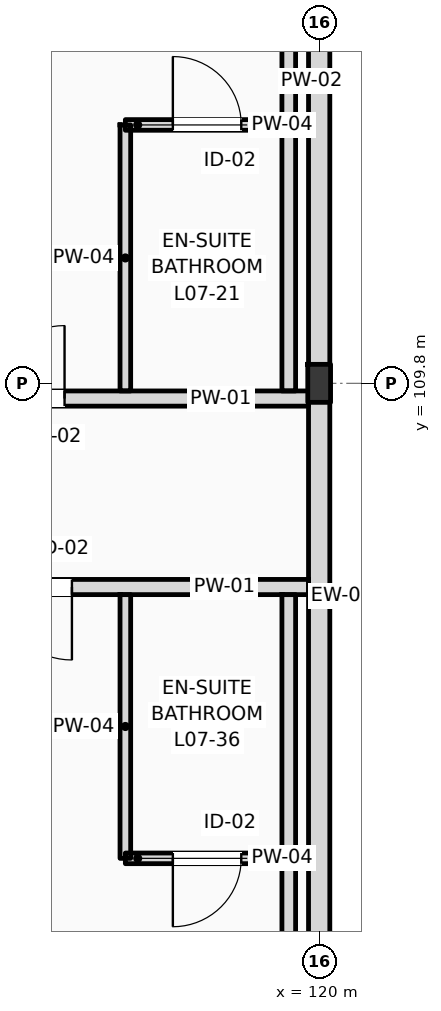
"""IFC4 building model, lengths in metres.
Left out: names, types, materials, properties, quantities, classifications, styles, units other than length and angle.
Written with IfcOpenShell. Run it as: python <this file> out.ifc"""

import sys

from ifc_helpers import new_model, si_unit, direction, frame, frame_2d, origin, origin_2d, place, context, subcontext, project, spatial, rectangle, i_section, extrude, element, fill, save


model = new_model("IFC4")
c1 = context("Model", 3, precision=1e-05, world=origin(), true_north=direction((0.0, 1.0)))
c2 = subcontext(c1, "Body", "Model", "MODEL_VIEW")
j1 = project(units=[si_unit("LENGTHUNIT", "METRE"), si_unit("PLANEANGLEUNIT", "RADIAN")], contexts=[c1])
p1 = place(None, origin())
s1 = spatial("IfcSite", under=j1, at=p1, CompositionType="ELEMENT")
p2 = place(p1, origin())
s2 = spatial("IfcBuilding", under=s1, at=p2, CompositionType="ELEMENT")
p3 = place(p2, frame((0.0, 0.0, 31.8)))
s3 = spatial("IfcBuildingStorey", under=s2, at=p3, CompositionType="ELEMENT", Elevation=31.8)
p4 = place(p3, frame((120.0, 109.8, 0.0), z_axis=(0.0, 0.0, 1.0), x_axis=(1.0, 0.0, 0.0)))
e1 = element("IfcColumn", 1, at=p4, inside=s3, PredefinedType="COLUMN", context=c2, shape_type="SweptSolid", body=[
    extrude(i_section(OverallWidth=0.3, OverallDepth=0.5, WebThickness=0.014, FlangeThickness=0.028, FilletRadius=0.027, at=origin_2d()), origin(), (0.0, 0.0, 1.0), 3.6),
])
p5 = place(p3, frame((120.0, 96.0, 0.0), z_axis=(0.0, 0.0, 1.0), x_axis=(0.0, 1.0, 0.0)))
e2 = element("IfcWall", 2, at=p5, inside=s3, PredefinedType="STANDARD", context=c2, shape_type="SweptSolid", body=[
    extrude(rectangle(XDim=22.0, YDim=0.28, at=frame_2d((11.0, 0.0))), origin(), (0.0, 0.0, 1.0), 2.91),
])
p6 = place(p3, frame((10.65, 109.6, 0.0), z_axis=(0.0, 0.0, 1.0), x_axis=(1.0, 0.0, 0.0)))
e3 = element("IfcWall", 3, at=p6, inside=s3, PredefinedType="PARTITIONING", context=c2, shape_type="SweptSolid", body=[
    extrude(rectangle(XDim=109.21, YDim=0.2, at=frame_2d((54.605, 0.0))), origin(), (0.0, 0.0, 1.0), 2.72),
])
p7 = place(p6, frame((15.825, 0.0, 0.0)))
e4 = element("IfcOpeningElement", 4, at=p7, cuts=e3, PredefinedType="OPENING", context=c2, shape_type="SweptSolid", body=[
    extrude(rectangle(XDim=1.02, YDim=2.2, at=frame_2d((0.51, 1.1))), frame((0.0, 0.11, 0.0), z_axis=(0.0, -1.0, 0.0), x_axis=(1.0, 0.0, 0.0)), (0.0, 0.0, 1.0), 0.22),
])
p8 = place(p6, frame((19.87, 0.0, 0.0)))
e5 = element("IfcOpeningElement", 5, at=p8, cuts=e3, PredefinedType="OPENING", context=c2, shape_type="SweptSolid", body=[
    extrude(rectangle(XDim=1.02, YDim=2.2, at=frame_2d((0.51, 1.1))), frame((0.0, 0.11, 0.0), z_axis=(0.0, -1.0, 0.0), x_axis=(1.0, 0.0, 0.0)), (0.0, 0.0, 1.0), 0.22),
])
p9 = place(p6, frame((24.47, 0.0, 0.0)))
e6 = element("IfcOpeningElement", 6, at=p9, cuts=e3, PredefinedType="OPENING", context=c2, shape_type="SweptSolid", body=[
    extrude(rectangle(XDim=1.02, YDim=2.2, at=frame_2d((0.51, 1.1))), frame((0.0, 0.11, 0.0), z_axis=(0.0, -1.0, 0.0), x_axis=(1.0, 0.0, 0.0)), (0.0, 0.0, 1.0), 0.22),
])
p10 = place(p6, frame((26.92, 0.0, 0.0)))
e7 = element("IfcOpeningElement", 7, at=p10, cuts=e3, PredefinedType="OPENING", context=c2, shape_type="SweptSolid", body=[
    extrude(rectangle(XDim=1.02, YDim=2.2, at=frame_2d((0.51, 1.1))), frame((0.0, 0.11, 0.0), z_axis=(0.0, -1.0, 0.0), x_axis=(1.0, 0.0, 0.0)), (0.0, 0.0, 1.0), 0.22),
])
p11 = place(p6, frame((33.7, 0.0, 0.0)))
e8 = element("IfcOpeningElement", 8, at=p11, cuts=e3, PredefinedType="OPENING", context=c2, shape_type="SweptSolid", body=[
    extrude(rectangle(XDim=0.96, YDim=2.2, at=frame_2d((0.48, 1.1))), frame((0.0, 0.11, 0.0), z_axis=(0.0, -1.0, 0.0), x_axis=(1.0, 0.0, 0.0)), (0.0, 0.0, 1.0), 0.22),
])
p12 = place(p6, frame((35.9, 0.0, 0.0)))
e9 = element("IfcOpeningElement", 9, at=p12, cuts=e3, PredefinedType="OPENING", context=c2, shape_type="SweptSolid", body=[
    extrude(rectangle(XDim=0.96, YDim=2.2, at=frame_2d((0.48, 1.1))), frame((0.0, 0.11, 0.0), z_axis=(0.0, -1.0, 0.0), x_axis=(1.0, 0.0, 0.0)), (0.0, 0.0, 1.0), 0.22),
])
p13 = place(p6, frame((42.9, 0.0, 0.0)))
e10 = element("IfcOpeningElement", 10, at=p13, cuts=e3, PredefinedType="OPENING", context=c2, shape_type="SweptSolid", body=[
    extrude(rectangle(XDim=0.96, YDim=2.2, at=frame_2d((0.48, 1.1))), frame((0.0, 0.11, 0.0), z_axis=(0.0, -1.0, 0.0), x_axis=(1.0, 0.0, 0.0)), (0.0, 0.0, 1.0), 0.22),
])
p14 = place(p6, frame((47.5, 0.0, 0.0)))
e11 = element("IfcOpeningElement", 11, at=p14, cuts=e3, PredefinedType="OPENING", context=c2, shape_type="SweptSolid", body=[
    extrude(rectangle(XDim=0.96, YDim=2.2, at=frame_2d((0.48, 1.1))), frame((0.0, 0.11, 0.0), z_axis=(0.0, -1.0, 0.0), x_axis=(1.0, 0.0, 0.0)), (0.0, 0.0, 1.0), 0.22),
])
p15 = place(p6, frame((49.95, 0.0, 0.0)))
e12 = element("IfcOpeningElement", 12, at=p15, cuts=e3, PredefinedType="OPENING", context=c2, shape_type="SweptSolid", body=[
    extrude(rectangle(XDim=0.96, YDim=2.2, at=frame_2d((0.48, 1.1))), frame((0.0, 0.11, 0.0), z_axis=(0.0, -1.0, 0.0), x_axis=(1.0, 0.0, 0.0)), (0.0, 0.0, 1.0), 0.22),
])
p16 = place(p6, frame((56.7, 0.0, 0.0)))
e13 = element("IfcOpeningElement", 13, at=p16, cuts=e3, PredefinedType="OPENING", context=c2, shape_type="SweptSolid", body=[
    extrude(rectangle(XDim=0.96, YDim=2.2, at=frame_2d((0.48, 1.1))), frame((0.0, 0.11, 0.0), z_axis=(0.0, -1.0, 0.0), x_axis=(1.0, 0.0, 0.0)), (0.0, 0.0, 1.0), 0.22),
])
p17 = place(p6, frame((59.15, 0.0, 0.0)))
e14 = element("IfcOpeningElement", 14, at=p17, cuts=e3, PredefinedType="OPENING", context=c2, shape_type="SweptSolid", body=[
    extrude(rectangle(XDim=0.96, YDim=2.2, at=frame_2d((0.48, 1.1))), frame((0.0, 0.11, 0.0), z_axis=(0.0, -1.0, 0.0), x_axis=(1.0, 0.0, 0.0)), (0.0, 0.0, 1.0), 0.22),
])
p18 = place(p6, frame((65.9, 0.0, 0.0)))
e15 = element("IfcOpeningElement", 15, at=p18, cuts=e3, PredefinedType="OPENING", context=c2, shape_type="SweptSolid", body=[
    extrude(rectangle(XDim=0.96, YDim=2.2, at=frame_2d((0.48, 1.1))), frame((0.0, 0.11, 0.0), z_axis=(0.0, -1.0, 0.0), x_axis=(1.0, 0.0, 0.0)), (0.0, 0.0, 1.0), 0.22),
])
p19 = place(p6, frame((70.5, 0.0, 0.0)))
e16 = element("IfcOpeningElement", 16, at=p19, cuts=e3, PredefinedType="OPENING", context=c2, shape_type="SweptSolid", body=[
    extrude(rectangle(XDim=0.96, YDim=2.2, at=frame_2d((0.48, 1.1))), frame((0.0, 0.11, 0.0), z_axis=(0.0, -1.0, 0.0), x_axis=(1.0, 0.0, 0.0)), (0.0, 0.0, 1.0), 0.22),
])
p20 = place(p6, frame((72.95, 0.0, 0.0)))
e17 = element("IfcOpeningElement", 17, at=p20, cuts=e3, PredefinedType="OPENING", context=c2, shape_type="SweptSolid", body=[
    extrude(rectangle(XDim=0.96, YDim=2.2, at=frame_2d((0.48, 1.1))), frame((0.0, 0.11, 0.0), z_axis=(0.0, -1.0, 0.0), x_axis=(1.0, 0.0, 0.0)), (0.0, 0.0, 1.0), 0.22),
])
p21 = place(p6, frame((79.7, 0.0, 0.0)))
e18 = element("IfcOpeningElement", 18, at=p21, cuts=e3, PredefinedType="OPENING", context=c2, shape_type="SweptSolid", body=[
    extrude(rectangle(XDim=0.96, YDim=2.2, at=frame_2d((0.48, 1.1))), frame((0.0, 0.11, 0.0), z_axis=(0.0, -1.0, 0.0), x_axis=(1.0, 0.0, 0.0)), (0.0, 0.0, 1.0), 0.22),
])
p22 = place(p6, frame((82.15, 0.0, 0.0)))
e19 = element("IfcOpeningElement", 19, at=p22, cuts=e3, PredefinedType="OPENING", context=c2, shape_type="SweptSolid", body=[
    extrude(rectangle(XDim=0.96, YDim=2.2, at=frame_2d((0.48, 1.1))), frame((0.0, 0.11, 0.0), z_axis=(0.0, -1.0, 0.0), x_axis=(1.0, 0.0, 0.0)), (0.0, 0.0, 1.0), 0.22),
])
p23 = place(p6, frame((88.9, 0.0, 0.0)))
e20 = element("IfcOpeningElement", 20, at=p23, cuts=e3, PredefinedType="OPENING", context=c2, shape_type="SweptSolid", body=[
    extrude(rectangle(XDim=0.96, YDim=2.2, at=frame_2d((0.48, 1.1))), frame((0.0, 0.11, 0.0), z_axis=(0.0, -1.0, 0.0), x_axis=(1.0, 0.0, 0.0)), (0.0, 0.0, 1.0), 0.22),
])
p24 = place(p6, frame((93.75, 0.0, 0.0)))
e21 = element("IfcOpeningElement", 21, at=p24, cuts=e3, PredefinedType="OPENING", context=c2, shape_type="SweptSolid", body=[
    extrude(rectangle(XDim=0.96, YDim=2.2, at=frame_2d((0.48, 1.1))), frame((0.0, 0.11, 0.0), z_axis=(0.0, -1.0, 0.0), x_axis=(1.0, 0.0, 0.0)), (0.0, 0.0, 1.0), 0.22),
])
p25 = place(p6, frame((98.1, 0.0, 0.0)))
e22 = element("IfcOpeningElement", 22, at=p25, cuts=e3, PredefinedType="OPENING", context=c2, shape_type="SweptSolid", body=[
    extrude(rectangle(XDim=0.96, YDim=2.2, at=frame_2d((0.48, 1.1))), frame((0.0, 0.11, 0.0), z_axis=(0.0, -1.0, 0.0), x_axis=(1.0, 0.0, 0.0)), (0.0, 0.0, 1.0), 0.22),
])
p26 = place(p6, frame((102.7, 0.0, 0.0)))
e23 = element("IfcOpeningElement", 23, at=p26, cuts=e3, PredefinedType="OPENING", context=c2, shape_type="SweptSolid", body=[
    extrude(rectangle(XDim=0.96, YDim=2.2, at=frame_2d((0.48, 1.1))), frame((0.0, 0.11, 0.0), z_axis=(0.0, -1.0, 0.0), x_axis=(1.0, 0.0, 0.0)), (0.0, 0.0, 1.0), 0.22),
])
p27 = place(p6, frame((105.04, 0.0, 0.0)))
e24 = element("IfcOpeningElement", 24, at=p27, cuts=e3, PredefinedType="OPENING", context=c2, shape_type="SweptSolid", body=[
    extrude(rectangle(XDim=0.96, YDim=2.2, at=frame_2d((0.48, 1.1))), frame((0.0, 0.11, 0.0), z_axis=(0.0, -1.0, 0.0), x_axis=(1.0, 0.0, 0.0)), (0.0, 0.0, 1.0), 0.22),
])
p28 = place(p6, frame((2.716, 0.0, 0.0)))
e25 = element("IfcOpeningElement", 25, at=p28, cuts=e3, PredefinedType="OPENING", context=c2, shape_type="SweptSolid", body=[
    extrude(rectangle(XDim=1.35, YDim=2.25, at=frame_2d((0.675, 1.125))), frame((0.0, 0.11, 0.0), z_axis=(0.0, -1.0, 0.0), x_axis=(1.0, 0.0, 0.0)), (0.0, 0.0, 1.0), 0.22),
])
p29 = place(p6, frame((6.65, 0.0, 0.0)))
e26 = element("IfcOpeningElement", 26, at=p29, cuts=e3, PredefinedType="OPENING", context=c2, shape_type="SweptSolid", body=[
    extrude(rectangle(XDim=1.35, YDim=2.25, at=frame_2d((0.675, 1.125))), frame((0.0, 0.11, 0.0), z_axis=(0.0, -1.0, 0.0), x_axis=(1.0, 0.0, 0.0)), (0.0, 0.0, 1.0), 0.22),
])
p30 = place(p6, frame((10.583, 0.0, 0.0)))
e27 = element("IfcOpeningElement", 27, at=p30, cuts=e3, PredefinedType="OPENING", context=c2, shape_type="SweptSolid", body=[
    extrude(rectangle(XDim=1.35, YDim=2.25, at=frame_2d((0.675, 1.125))), frame((0.0, 0.11, 0.0), z_axis=(0.0, -1.0, 0.0), x_axis=(1.0, 0.0, 0.0)), (0.0, 0.0, 1.0), 0.22),
])
p31 = place(p3, frame((79.76, 107.12, 0.0), z_axis=(0.0, 0.0, 1.0), x_axis=(1.0, 0.0, 0.0)))
e28 = element("IfcWall", 28, at=p31, inside=s3, PredefinedType="PARTITIONING", context=c2, shape_type="SweptSolid", body=[
    extrude(rectangle(XDim=40.1, YDim=0.2, at=frame_2d((20.05, 0.0))), origin(), (0.0, 0.0, 1.0), 3.36),
])
p32 = place(p31, frame((2.887, 0.0, 0.0)))
e29 = element("IfcOpeningElement", 29, at=p32, cuts=e28, PredefinedType="OPENING", context=c2, shape_type="SweptSolid", body=[
    extrude(rectangle(XDim=0.96, YDim=2.2, at=frame_2d((0.48, 1.1))), frame((0.0, 0.11, 0.0), z_axis=(0.0, -1.0, 0.0), x_axis=(1.0, 0.0, 0.0)), (0.0, 0.0, 1.0), 0.22),
])
p33 = place(p31, frame((5.121, 0.0, 0.0)))
e30 = element("IfcOpeningElement", 30, at=p33, cuts=e28, PredefinedType="OPENING", context=c2, shape_type="SweptSolid", body=[
    extrude(rectangle(XDim=0.96, YDim=2.2, at=frame_2d((0.48, 1.1))), frame((0.0, 0.11, 0.0), z_axis=(0.0, -1.0, 0.0), x_axis=(1.0, 0.0, 0.0)), (0.0, 0.0, 1.0), 0.22),
])
p34 = place(p31, frame((11.698, 0.0, 0.0)))
e31 = element("IfcOpeningElement", 31, at=p34, cuts=e28, PredefinedType="OPENING", context=c2, shape_type="SweptSolid", body=[
    extrude(rectangle(XDim=0.96, YDim=2.2, at=frame_2d((0.48, 1.1))), frame((0.0, 0.11, 0.0), z_axis=(0.0, -1.0, 0.0), x_axis=(1.0, 0.0, 0.0)), (0.0, 0.0, 1.0), 0.22),
])
p35 = place(p31, frame((13.976, 0.0, 0.0)))
e32 = element("IfcOpeningElement", 32, at=p35, cuts=e28, PredefinedType="OPENING", context=c2, shape_type="SweptSolid", body=[
    extrude(rectangle(XDim=0.96, YDim=2.2, at=frame_2d((0.48, 1.1))), frame((0.0, 0.11, 0.0), z_axis=(0.0, -1.0, 0.0), x_axis=(1.0, 0.0, 0.0)), (0.0, 0.0, 1.0), 0.22),
])
p36 = place(p31, frame((20.554, 0.0, 0.0)))
e33 = element("IfcOpeningElement", 33, at=p36, cuts=e28, PredefinedType="OPENING", context=c2, shape_type="SweptSolid", body=[
    extrude(rectangle(XDim=0.96, YDim=2.2, at=frame_2d((0.48, 1.1))), frame((0.0, 0.11, 0.0), z_axis=(0.0, -1.0, 0.0), x_axis=(1.0, 0.0, 0.0)), (0.0, 0.0, 1.0), 0.22),
])
p37 = place(p31, frame((24.982, 0.0, 0.0)))
e34 = element("IfcOpeningElement", 34, at=p37, cuts=e28, PredefinedType="OPENING", context=c2, shape_type="SweptSolid", body=[
    extrude(rectangle(XDim=0.96, YDim=2.2, at=frame_2d((0.48, 1.1))), frame((0.0, 0.11, 0.0), z_axis=(0.0, -1.0, 0.0), x_axis=(1.0, 0.0, 0.0)), (0.0, 0.0, 1.0), 0.22),
])
p38 = place(p31, frame((29.409, 0.0, 0.0)))
e35 = element("IfcOpeningElement", 35, at=p38, cuts=e28, PredefinedType="OPENING", context=c2, shape_type="SweptSolid", body=[
    extrude(rectangle(XDim=0.96, YDim=2.2, at=frame_2d((0.48, 1.1))), frame((0.0, 0.11, 0.0), z_axis=(0.0, -1.0, 0.0), x_axis=(1.0, 0.0, 0.0)), (0.0, 0.0, 1.0), 0.22),
])
p39 = place(p31, frame((33.837, 0.0, 0.0)))
e36 = element("IfcOpeningElement", 36, at=p39, cuts=e28, PredefinedType="OPENING", context=c2, shape_type="SweptSolid", body=[
    extrude(rectangle(XDim=0.96, YDim=2.2, at=frame_2d((0.48, 1.1))), frame((0.0, 0.11, 0.0), z_axis=(0.0, -1.0, 0.0), x_axis=(1.0, 0.0, 0.0)), (0.0, 0.0, 1.0), 0.22),
])
p40 = place(p31, frame((36.027, 0.0, 0.0)))
e37 = element("IfcOpeningElement", 37, at=p40, cuts=e28, PredefinedType="OPENING", context=c2, shape_type="SweptSolid", body=[
    extrude(rectangle(XDim=0.96, YDim=2.2, at=frame_2d((0.48, 1.1))), frame((0.0, 0.11, 0.0), z_axis=(0.0, -1.0, 0.0), x_axis=(1.0, 0.0, 0.0)), (0.0, 0.0, 1.0), 0.22),
])
p41 = place(p3, frame((119.6, 109.7, 0.0), z_axis=(0.0, 0.0, 1.0), x_axis=(0.0, 1.0, 0.0)))
e38 = element("IfcWall", 38, at=p41, inside=s3, PredefinedType="PARTITIONING", context=c2, shape_type="SweptSolid", body=[
    extrude(rectangle(XDim=8.15, YDim=0.18, at=frame_2d((4.075, 0.0))), origin(), (0.0, 0.0, 1.0), 3.36),
])
p42 = place(p3, frame((117.45, 109.7, 0.0), z_axis=(0.0, 0.0, 1.0), x_axis=(0.0, 1.0, 0.0)))
e39 = element("IfcWall", 39, at=p42, inside=s3, PredefinedType="PARTITIONING", context=c2, shape_type="SweptSolid", body=[
    extrude(rectangle(XDim=3.5, YDim=0.14, at=frame_2d((1.75, 0.0))), origin(), (0.0, 0.0, 1.0), 3.36),
])
p43 = place(p3, frame((117.45, 113.2, 0.0), z_axis=(0.0, 0.0, 1.0), x_axis=(1.0, 0.0, 0.0)))
e40 = element("IfcWall", 40, at=p43, inside=s3, PredefinedType="PARTITIONING", context=c2, shape_type="SweptSolid", body=[
    extrude(rectangle(XDim=2.15, YDim=0.14, at=frame_2d((1.075, 0.0))), origin(), (0.0, 0.0, 1.0), 3.36),
])
p44 = place(p43, frame((0.625, 0.0, 0.0)))
e41 = element("IfcOpeningElement", 41, at=p44, cuts=e40, PredefinedType="OPENING", context=c2, shape_type="SweptSolid", body=[
    extrude(rectangle(XDim=0.9, YDim=2.1, at=frame_2d((0.45, 1.05))), frame((0.0, 0.08, 0.0), z_axis=(0.0, -1.0, 0.0), x_axis=(1.0, 0.0, 0.0)), (0.0, 0.0, 1.0), 0.16),
])
p45 = place(p3, frame((119.6, 96.14, 0.0), z_axis=(0.0, 0.0, 1.0), x_axis=(0.0, 1.0, 0.0)))
e42 = element("IfcWall", 42, at=p45, inside=s3, PredefinedType="PARTITIONING", context=c2, shape_type="SweptSolid", body=[
    extrude(rectangle(XDim=10.88, YDim=0.18, at=frame_2d((5.44, 0.0))), origin(), (0.0, 0.0, 1.0), 3.36),
])
p46 = place(p3, frame((117.45, 103.55, 0.0), z_axis=(0.0, 0.0, 1.0), x_axis=(0.0, 1.0, 0.0)))
e43 = element("IfcWall", 43, at=p46, inside=s3, PredefinedType="PARTITIONING", context=c2, shape_type="SweptSolid", body=[
    extrude(rectangle(XDim=3.47, YDim=0.14, at=frame_2d((1.735, 0.0))), origin(), (0.0, 0.0, 1.0), 3.36),
])
p47 = place(p3, frame((117.45, 103.55, 0.0), z_axis=(0.0, 0.0, 1.0), x_axis=(1.0, 0.0, 0.0)))
e44 = element("IfcWall", 44, at=p47, inside=s3, PredefinedType="PARTITIONING", context=c2, shape_type="SweptSolid", body=[
    extrude(rectangle(XDim=2.15, YDim=0.14, at=frame_2d((1.075, 0.0))), origin(), (0.0, 0.0, 1.0), 3.36),
])
p48 = place(p47, frame((0.625, 0.0, 0.0)))
e45 = element("IfcOpeningElement", 45, at=p48, cuts=e44, PredefinedType="OPENING", context=c2, shape_type="SweptSolid", body=[
    extrude(rectangle(XDim=0.9, YDim=2.1, at=frame_2d((0.45, 1.05))), frame((0.0, 0.08, 0.0), z_axis=(0.0, -1.0, 0.0), x_axis=(1.0, 0.0, 0.0)), (0.0, 0.0, 1.0), 0.16),
])
p49 = place(p27, origin())
e46 = element("IfcDoor", 46, at=p49, inside=s3, OperationType="SINGLE_SWING_RIGHT", PredefinedType="DOOR", context=c2, shape_type="SweptSolid", body=[
    extrude(rectangle(XDim=0.96, YDim=2.2, at=frame_2d((0.48, 1.1))), frame((0.0, 0.025, 0.0), z_axis=(0.0, -1.0, 0.0), x_axis=(1.0, 0.0, 0.0)), (0.0, 0.0, 1.0), 0.05),
])
fill(e24, e46)
p50 = place(p44, origin())
e47 = element("IfcDoor", 47, at=p50, inside=s3, OperationType="SINGLE_SWING_LEFT", PredefinedType="DOOR", context=c2, shape_type="SweptSolid", body=[
    extrude(rectangle(XDim=0.9, YDim=2.1, at=frame_2d((0.45, 1.05))), frame((0.0, 0.025, 0.0), z_axis=(0.0, -1.0, 0.0), x_axis=(1.0, 0.0, 0.0)), (0.0, 0.0, 1.0), 0.05),
])
fill(e41, e47)
p51 = place(p40, frame((0.96, 0.0, 0.0), z_axis=(0.0, 0.0, 1.0), x_axis=(-1.0, 0.0, 0.0)))
e48 = element("IfcDoor", 48, at=p51, inside=s3, OperationType="SINGLE_SWING_RIGHT", PredefinedType="DOOR", context=c2, shape_type="SweptSolid", body=[
    extrude(rectangle(XDim=0.96, YDim=2.2, at=frame_2d((0.48, 1.1))), frame((0.0, 0.025, 0.0), z_axis=(0.0, -1.0, 0.0), x_axis=(1.0, 0.0, 0.0)), (0.0, 0.0, 1.0), 0.05),
])
fill(e37, e48)
p52 = place(p48, frame((0.9, 0.0, 0.0), z_axis=(0.0, 0.0, 1.0), x_axis=(-1.0, 0.0, 0.0)))
e49 = element("IfcDoor", 49, at=p52, inside=s3, OperationType="SINGLE_SWING_LEFT", PredefinedType="DOOR", context=c2, shape_type="SweptSolid", body=[
    extrude(rectangle(XDim=0.9, YDim=2.1, at=frame_2d((0.45, 1.05))), frame((0.0, 0.025, 0.0), z_axis=(0.0, -1.0, 0.0), x_axis=(1.0, 0.0, 0.0)), (0.0, 0.0, 1.0), 0.05),
])
fill(e45, e49)
save(model, sys.argv[1])
